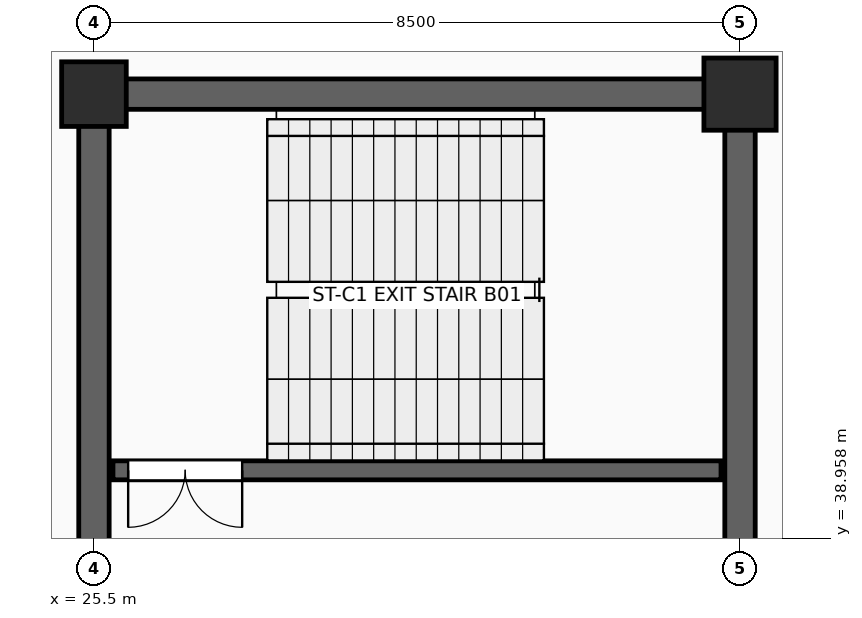
"""IFC4 building model, lengths in metres.
Left out: names, types, materials, properties, quantities, classifications, styles, units other than length and angle.
Written with IfcOpenShell. Run it as: python <this file> out.ifc"""

import sys

from ifc_helpers import new_model, si_unit, direction, frame, frame_2d, origin, origin_2d, place, context, subcontext, project, spatial, rectangle, extrude, element, fill, save


model = new_model("IFC4")
c1 = context("Model", 3, precision=1e-05, world=origin(), true_north=direction((0.0, 1.0)))
c2 = subcontext(c1, "Body", "Model", "MODEL_VIEW")
j1 = project(units=[si_unit("LENGTHUNIT", "METRE"), si_unit("PLANEANGLEUNIT", "RADIAN")], contexts=[c1])
p1 = place(None, origin())
s1 = spatial("IfcSite", under=j1, at=p1, CompositionType="ELEMENT")
p2 = place(p1, origin())
s2 = spatial("IfcBuilding", under=s1, at=p2, CompositionType="ELEMENT")
p3 = place(p2, frame((0.0, 0.0, -4.8)))
s3 = spatial("IfcBuildingStorey", under=s2, at=p3, CompositionType="ELEMENT", Elevation=-4.8)
p4 = place(p3, frame((25.5, 32.0, 0.0), z_axis=(0.0, 0.0, 1.0), x_axis=(0.0, 1.0, 0.0)))
e1 = element("IfcWall", 1, at=p4, inside=s3, PredefinedType="SHEAR", context=c2, shape_type="SweptSolid", body=[
    extrude(rectangle(XDim=12.8, YDim=0.4, at=frame_2d((6.4, 0.0))), origin(), (0.0, 0.0, 1.0), 4.64),
])
p5 = place(p4, frame((1.25, 0.0, 0.0)))
e2 = element("IfcOpeningElement", 2, at=p5, cuts=e1, PredefinedType="OPENING", context=c2, shape_type="SweptSolid", body=[
    extrude(rectangle(XDim=1.05, YDim=2.15, at=frame_2d((0.525, 1.075))), frame((0.0, 0.212, 0.0), z_axis=(0.0, -1.0, 0.0), x_axis=(1.0, 0.0, 0.0)), (0.0, 0.0, 1.0), 0.424),
])
p6 = place(p3, frame((34.0, 32.0, 0.0), z_axis=(0.0, 0.0, 1.0), x_axis=(0.0, 1.0, 0.0)))
e3 = element("IfcWall", 3, at=p6, inside=s3, PredefinedType="SHEAR", context=c2, shape_type="SweptSolid", body=[
    extrude(rectangle(XDim=12.8, YDim=0.4, at=frame_2d((6.4, 0.0))), origin(), (0.0, 0.0, 1.0), 4.64),
])
p7 = place(p3, frame((25.7, 44.8, 0.0), z_axis=(0.0, 0.0, 1.0), x_axis=(1.0, 0.0, 0.0)))
e4 = element("IfcWall", 4, at=p7, inside=s3, PredefinedType="SHEAR", context=c2, shape_type="SweptSolid", body=[
    extrude(rectangle(XDim=8.1, YDim=0.4, at=frame_2d((4.05, 0.0))), origin(), (0.0, 0.0, 1.0), 4.64),
])
p8 = place(p3, frame((25.75, 39.85, 0.0), z_axis=(0.0, 0.0, 1.0), x_axis=(1.0, 0.0, 0.0)))
e5 = element("IfcWall", 5, at=p8, inside=s3, PredefinedType="STANDARD", context=c2, shape_type="SweptSolid", body=[
    extrude(rectangle(XDim=8.0, YDim=0.25, at=frame_2d((4.0, 0.0))), origin(), (0.0, 0.0, 1.0), 4.64),
])
p9 = place(p8, frame((0.2, 0.0, 0.0)))
e6 = element("IfcOpeningElement", 6, at=p9, cuts=e5, PredefinedType="OPENING", context=c2, shape_type="SweptSolid", body=[
    extrude(rectangle(XDim=1.5, YDim=2.2, at=frame_2d((0.75, 1.1))), frame((0.0, 0.137, 0.0), z_axis=(0.0, -1.0, 0.0), x_axis=(1.0, 0.0, 0.0)), (0.0, 0.0, 1.0), 0.274),
])
p10 = place(p3, frame((25.5, 44.8, 0.0), z_axis=(0.0, 0.0, 1.0), x_axis=(1.0, 0.0, 0.0)))
e7 = element("IfcColumn", 7, at=p10, inside=s3, PredefinedType="COLUMN", context=c2, shape_type="SweptSolid", body=[
    extrude(rectangle(XDim=0.85, YDim=0.85, at=origin_2d()), origin(), (0.0, 0.0, 1.0), 4.46),
])
p11 = place(p3, frame((34.0, 44.8, 0.0), z_axis=(0.0, 0.0, 1.0), x_axis=(1.0, 0.0, 0.0)))
e8 = element("IfcColumn", 8, at=p11, inside=s3, PredefinedType="COLUMN", context=c2, shape_type="SweptSolid", body=[
    extrude(rectangle(XDim=0.95, YDim=0.95, at=origin_2d()), origin(), (0.0, 0.0, 1.0), 4.46),
])
p12 = place(p9, frame((1.5, 0.0, 0.0), z_axis=(0.0, 0.0, 1.0), x_axis=(-1.0, 0.0, 0.0)))
e9 = element("IfcDoor", 9, at=p12, inside=s3, OperationType="DOUBLE_DOOR_SINGLE_SWING", PredefinedType="DOOR", context=c2, shape_type="SweptSolid", body=[
    extrude(rectangle(XDim=1.5, YDim=2.2, at=frame_2d((0.75, 1.1))), frame((0.0, 0.025, 0.0), z_axis=(0.0, -1.0, 0.0), x_axis=(1.0, 0.0, 0.0)), (0.0, 0.0, 1.0), 0.05),
])
fill(e6, e9)
save(model, sys.argv[1])
